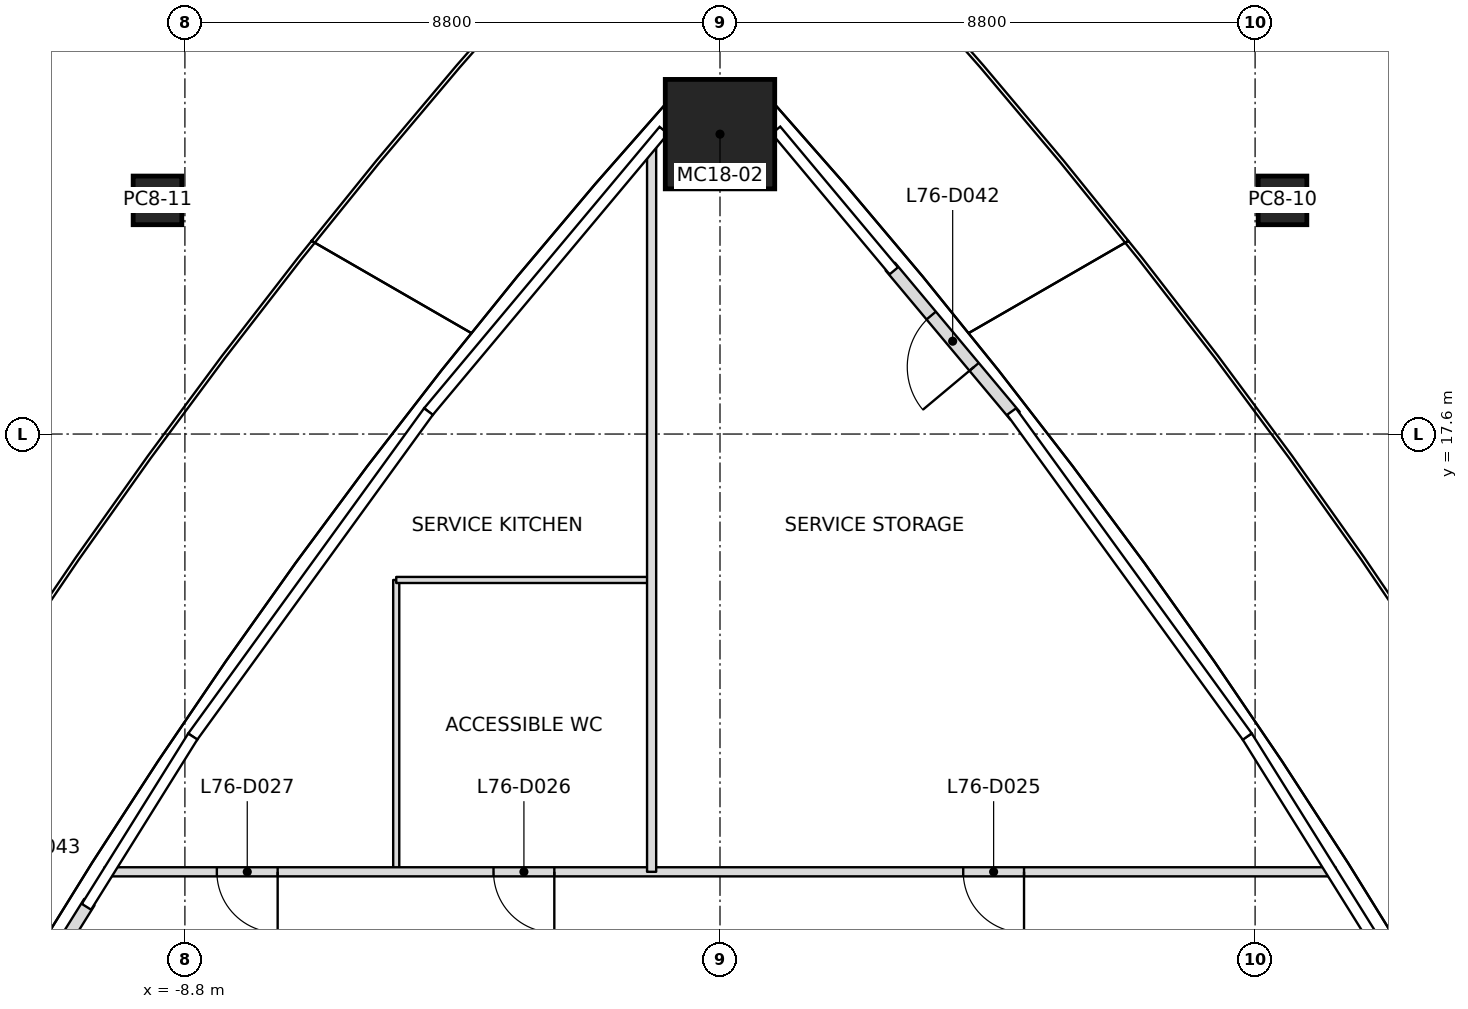
"""IFC4 building model, lengths in metres.
Left out: names, types, materials, properties, quantities, classifications, styles, units other than length and angle.
Written with IfcOpenShell. Run it as: python <this file> out.ifc"""

import sys

from ifc_helpers import new_model, si_unit, direction, frame, frame_2d, origin, origin_2d, place, context, subcontext, project, spatial, rectangle, extrude, clip, halfspace, element, fill, save


model = new_model("IFC4")
c1 = context("Model", 3, precision=1e-05, world=origin(), true_north=direction((0.0, 1.0)))
c2 = subcontext(c1, "Body", "Model", "MODEL_VIEW")
j1 = project(units=[si_unit("LENGTHUNIT", "METRE"), si_unit("PLANEANGLEUNIT", "RADIAN")], contexts=[c1])
p1 = place(None, origin())
s1 = spatial("IfcSite", under=j1, at=p1, CompositionType="ELEMENT")
p2 = place(p1, origin())
s2 = spatial("IfcBuilding", under=s1, at=p2, CompositionType="ELEMENT")
p3 = place(p2, frame((0.0, 0.0, 339.4)))
s3 = spatial("IfcBuildingStorey", under=s2, at=p3, CompositionType="ELEMENT", Elevation=339.4)
p4 = place(p3, frame((0.0, 22.532, 0.0), z_axis=(0.0, 0.0, 1.0), x_axis=(1.0, 0.0, 0.0)))
e1 = element("IfcColumn", 1, at=p4, inside=s3, PredefinedType="COLUMN", context=c2, shape_type="SweptSolid", body=[
    clip(extrude(rectangle(XDim=1.8, YDim=1.8, at=origin_2d()), origin(), (0.0, 0.0, 1.0), 5.4), halfspace(frame((0.0, 0.0, 0.007)), True)),
])
for number, where, z_axis, x_axis in (
    (2, (9.251, 21.443, 0.0), (0.0, 0.0, 1.0), (-0.615, 0.789, 0.0)),
    (3, (-9.251, 21.443, 0.0), (0.0, 0.0, 1.0), (0.615, 0.789, 0.0)),
):
    element("IfcColumn", number, at=place(p3, frame(where, z_axis=z_axis, x_axis=x_axis)), inside=s3, PredefinedType="COLUMN", context=c2, shape_type="SweptSolid", body=[
        clip(extrude(rectangle(XDim=0.8, YDim=0.8, at=origin_2d()), origin(), (0.0, 0.0, 1.0), 5.4), halfspace(frame((0.0, 0.0, 0.003)), True)),
    ])
p5 = place(p3, frame((4.853, 17.901, 0.0), z_axis=(0.0, 0.0, 1.0), x_axis=(-0.641685057582, 0.766968243721, 0.0)))
e4 = element("IfcWall", 4, at=p5, inside=s3, PredefinedType="SOLIDWALL", context=c2, shape_type="SweptSolid", body=[
    extrude(rectangle(XDim=3.198, YDim=0.2, at=frame_2d((1.599, 0.0))), origin(), (0.0, 0.0, 1.0), 4.64),
])
p6 = place(p5, frame((1.049, 0.0, 0.0)))
e5 = element("IfcOpeningElement", 5, at=p6, cuts=e4, PredefinedType="OPENING", context=c2, shape_type="SweptSolid", body=[
    extrude(rectangle(XDim=1.1, YDim=2.1, at=frame_2d((0.55, 1.05))), frame((0.0, 0.1, 0.0), z_axis=(0.0, -1.0, 0.0), x_axis=(1.0, 0.0, 0.0)), (0.0, 0.0, 1.0), 0.2),
])
p7 = place(p3, frame((-10.372, 9.901, 0.0), z_axis=(0.0, 0.0, 1.0), x_axis=(-0.52965846741, -0.84821100435, 0.0)))
e6 = element("IfcWall", 6, at=p7, inside=s3, PredefinedType="SOLIDWALL", context=c2, shape_type="SweptSolid", body=[
    extrude(rectangle(XDim=3.481, YDim=0.2, at=frame_2d((1.74, 0.0))), origin(), (0.0, 0.0, 1.0), 4.533),
])
p8 = place(p7, frame((1.19, 0.0, 0.0)))
e7 = element("IfcOpeningElement", 7, at=p8, cuts=e6, PredefinedType="OPENING", context=c2, shape_type="SweptSolid", body=[
    extrude(rectangle(XDim=1.1, YDim=2.1, at=frame_2d((0.55, 1.05))), frame((0.0, 0.1, 0.0), z_axis=(0.0, -1.0, 0.0), x_axis=(1.0, 0.0, 0.0)), (0.0, 0.0, 1.0), 0.2),
])
p9 = place(p3, frame((-1.125, 10.4, 0.0), z_axis=(0.0, 0.0, 1.0), x_axis=(0.0, 1.0, 0.0)))
e8 = element("IfcWall", 8, at=p9, inside=s3, PredefinedType="PARTITIONING", context=c2, shape_type="SweptSolid", body=[
    extrude(rectangle(XDim=11.989, YDim=0.15, at=frame_2d((5.994, 0.0))), origin(), (0.0, 0.0, 1.0), 4.533),
])
p10 = place(p3, frame((10.125, 10.4, 0.0), z_axis=(0.0, 0.0, 1.0), x_axis=(-1.0, 0.0, 0.0)))
e9 = element("IfcWall", 9, at=p10, inside=s3, PredefinedType="PARTITIONING", context=c2, shape_type="SweptSolid", body=[
    extrude(rectangle(XDim=20.25, YDim=0.15, at=frame_2d((10.125, 0.0))), origin(), (0.0, 0.0, 1.0), 4.533),
])
p11 = place(p10, frame((5.125, 0.0, 0.0)))
e10 = element("IfcOpeningElement", 10, at=p11, cuts=e9, PredefinedType="OPENING", context=c2, shape_type="SweptSolid", body=[
    extrude(rectangle(XDim=1.0, YDim=2.1, at=frame_2d((0.5, 1.05))), frame((0.0, 0.075, 0.0), z_axis=(0.0, -1.0, 0.0), x_axis=(1.0, 0.0, 0.0)), (0.0, 0.0, 1.0), 0.15),
])
p12 = place(p10, frame((12.849, 0.0, 0.0)))
e11 = element("IfcOpeningElement", 11, at=p12, cuts=e9, PredefinedType="OPENING", context=c2, shape_type="SweptSolid", body=[
    extrude(rectangle(XDim=1.0, YDim=2.1, at=frame_2d((0.5, 1.05))), frame((0.0, 0.075, 0.0), z_axis=(0.0, -1.0, 0.0), x_axis=(1.0, 0.0, 0.0)), (0.0, 0.0, 1.0), 0.15),
])
p13 = place(p10, frame((17.399, 0.0, 0.0)))
e12 = element("IfcOpeningElement", 12, at=p13, cuts=e9, PredefinedType="OPENING", context=c2, shape_type="SweptSolid", body=[
    extrude(rectangle(XDim=1.0, YDim=2.1, at=frame_2d((0.5, 1.05))), frame((0.0, 0.075, 0.0), z_axis=(0.0, -1.0, 0.0), x_axis=(1.0, 0.0, 0.0)), (0.0, 0.0, 1.0), 0.15),
])
p14 = place(p3, frame((-5.325, 10.43, 0.0), z_axis=(0.0, 0.0, 1.0), x_axis=(0.0, 1.0, 0.0)))
e13 = element("IfcWall", 13, at=p14, inside=s3, PredefinedType="PARTITIONING", context=c2, shape_type="SweptSolid", body=[
    extrude(rectangle(XDim=4.77, YDim=0.1, at=frame_2d((2.385, 0.0))), origin(), (0.0, 0.0, 1.0), 4.547),
])
p15 = place(p3, frame((-5.325, 15.2, 0.0), z_axis=(0.0, 0.0, 1.0), x_axis=(1.0, 0.0, 0.0)))
e14 = element("IfcWall", 14, at=p15, inside=s3, PredefinedType="PARTITIONING", context=c2, shape_type="SweptSolid", body=[
    extrude(rectangle(XDim=4.17, YDim=0.1, at=frame_2d((2.085, 0.0))), origin(), (0.0, 0.0, 1.0), 4.533),
])
p16 = place(p6, origin())
e15 = element("IfcDoor", 15, at=p16, inside=s3, OperationType="SINGLE_SWING_LEFT", PredefinedType="DOOR", context=c2, shape_type="SweptSolid", body=[
    extrude(rectangle(XDim=1.1, YDim=2.1, at=frame_2d((0.55, 1.05))), frame((0.0, 0.025, 0.0), z_axis=(0.0, -1.0, 0.0), x_axis=(1.0, 0.0, 0.0)), (0.0, 0.0, 1.0), 0.05),
])
fill(e5, e15)
p17 = place(p11, origin())
e16 = element("IfcDoor", 16, at=p17, inside=s3, OperationType="SINGLE_SWING_LEFT", PredefinedType="DOOR", context=c2, shape_type="SweptSolid", body=[
    extrude(rectangle(XDim=1.0, YDim=2.1, at=frame_2d((0.5, 1.05))), frame((0.0, 0.025, 0.0), z_axis=(0.0, -1.0, 0.0), x_axis=(1.0, 0.0, 0.0)), (0.0, 0.0, 1.0), 0.05),
])
fill(e10, e16)
p18 = place(p12, origin())
e17 = element("IfcDoor", 17, at=p18, inside=s3, OperationType="SINGLE_SWING_LEFT", PredefinedType="DOOR", context=c2, shape_type="SweptSolid", body=[
    extrude(rectangle(XDim=1.0, YDim=2.1, at=frame_2d((0.5, 1.05))), frame((0.0, 0.025, 0.0), z_axis=(0.0, -1.0, 0.0), x_axis=(1.0, 0.0, 0.0)), (0.0, 0.0, 1.0), 0.05),
])
fill(e11, e17)
p19 = place(p13, origin())
e18 = element("IfcDoor", 18, at=p19, inside=s3, OperationType="SINGLE_SWING_RIGHT", PredefinedType="DOOR", context=c2, shape_type="SweptSolid", body=[
    extrude(rectangle(XDim=1.0, YDim=2.1, at=frame_2d((0.5, 1.05))), frame((0.0, 0.025, 0.0), z_axis=(0.0, -1.0, 0.0), x_axis=(1.0, 0.0, 0.0)), (0.0, 0.0, 1.0), 0.05),
])
fill(e12, e18)
save(model, sys.argv[1])
